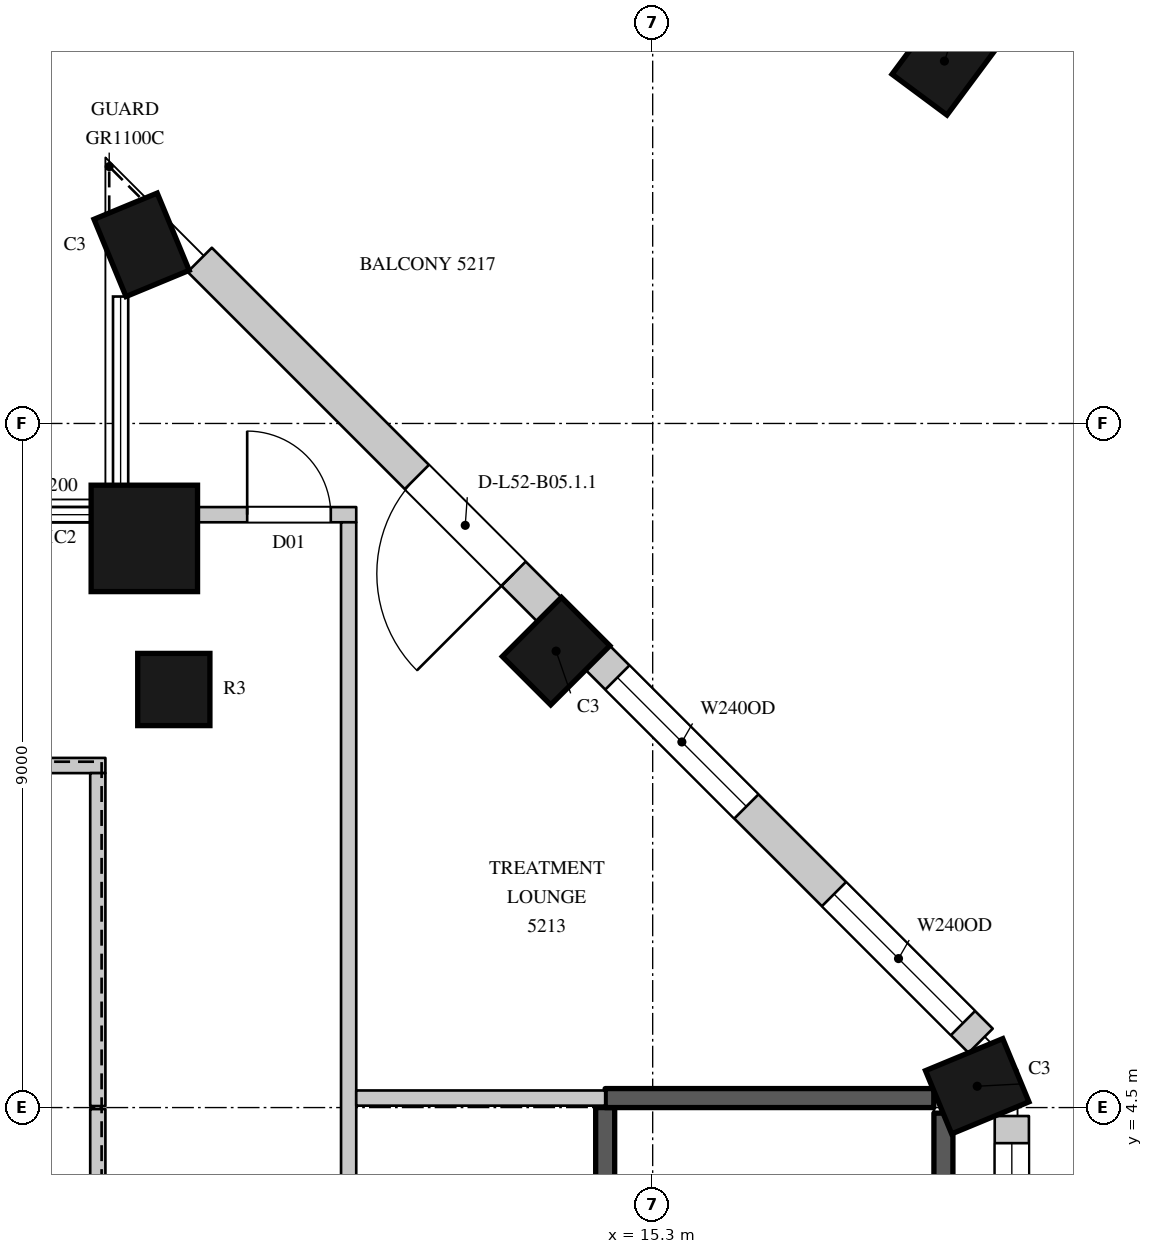
"""IFC4 building model, lengths in metres.
Left out: names, types, materials, properties, quantities, classifications, styles, units other than length and angle.
Written with IfcOpenShell. Run it as: python <this file> out.ifc"""

import sys

from ifc_helpers import new_model, si_unit, direction, frame, frame_2d, origin, origin_2d, place, context, subcontext, project, spatial, rectangle, circle, extrude, element, fill, save


model = new_model("IFC4")
c1 = context("Model", 3, precision=1e-05, world=origin(), true_north=direction((0.0, 1.0)))
c2 = subcontext(c1, "Body", "Model", "MODEL_VIEW")
j1 = project(units=[si_unit("LENGTHUNIT", "METRE"), si_unit("PLANEANGLEUNIT", "RADIAN")], contexts=[c1])
p1 = place(None, origin())
s1 = spatial("IfcSite", under=j1, at=p1, CompositionType="ELEMENT")
p2 = place(p1, origin())
s2 = spatial("IfcBuilding", under=s1, at=p2, CompositionType="ELEMENT")
p3 = place(p2, frame((0.0, 0.0, 234.3)))
s3 = spatial("IfcBuildingStorey", under=s2, at=p3, CompositionType="ELEMENT", Elevation=234.3)
for number, where, z_axis, x_axis in (
    (1, (19.57, 4.78, 0.0), (0.0, 0.0, 1.0), (-0.383, 0.924, 0.0)),
    (2, (14.029, 10.505, 0.0), (0.0, 0.0, 1.0), (-0.707, 0.707, 0.0)),
    (3, (8.576, 15.85, 0.0), (0.0, 0.0, 1.0), (-0.924, -0.383, 0.0)),
):
    element("IfcColumn", number, at=place(p3, frame(where, z_axis=z_axis, x_axis=x_axis)), inside=s3, PredefinedType="COLUMN", context=c2, shape_type="SweptSolid", body=[
        extrude(rectangle(XDim=0.9, YDim=1.1, at=origin_2d()), origin(), (0.0, 0.0, 1.0), 4.1),
    ])
p4 = place(p3, frame((8.612, 11.988, 0.0), z_axis=(0.0, 0.0, 1.0), x_axis=(1.0, 0.0, 0.0)))
e4 = element("IfcColumn", 4, at=p4, inside=s3, PredefinedType="COLUMN", context=c2, shape_type="SweptSolid", body=[
    extrude(circle(Radius=0.7, at=origin_2d()), origin(), (0.0, 0.0, 1.0), 4.1),
])
p5 = place(p3, frame((19.138, 18.268, 0.0), z_axis=(0.0, 0.0, 1.0), x_axis=(-0.802798546114, 0.596250362144, 0.0)))
e5 = element("IfcColumn", 5, at=p5, inside=s3, PredefinedType="COLUMN", context=c2, shape_type="SweptSolid", body=[
    extrude(rectangle(XDim=0.9, YDim=1.1, at=origin_2d()), origin(), (0.0, 0.0, 1.0), 4.1),
])
p6 = place(p3, frame((9.0, 10.0, 0.0), z_axis=(0.0, 0.0, 1.0), x_axis=(1.0, 0.0, 0.0)))
e6 = element("IfcColumn", 6, at=p6, inside=s3, PredefinedType="COLUMN", context=c2, shape_type="SweptSolid", body=[
    extrude(circle(Radius=0.475, at=origin_2d()), origin(), (0.0, 0.0, 1.0), 4.1),
])
p7 = place(p3, frame((20.025, -4.05, 0.0), z_axis=(0.0, 0.0, 1.0), x_axis=(0.0, 1.0, 0.0)))
e7 = element("IfcWall", 7, at=p7, inside=s3, PredefinedType="SOLIDWALL", context=c2, shape_type="SweptSolid", body=[
    extrude(rectangle(XDim=8.439, YDim=0.45, at=frame_2d((4.219, 0.0))), origin(), (0.0, 0.0, 1.0), 3.8),
])
p8 = place(p7, frame((0.394, 0.0, 1.05)))
e8 = element("IfcOpeningElement", 8, at=p8, cuts=e7, PredefinedType="OPENING", context=c2, shape_type="SweptSolid", body=[
    extrude(rectangle(XDim=3.0, YDim=2.4, at=frame_2d((1.5, 1.2))), frame((0.0, 0.235, 0.0), z_axis=(0.0, -1.0, 0.0), x_axis=(1.0, 0.0, 0.0)), (0.0, 0.0, 1.0), 0.47),
])
p9 = place(p7, frame((5.082, 0.0, 1.05)))
e9 = element("IfcOpeningElement", 9, at=p9, cuts=e7, PredefinedType="OPENING", context=c2, shape_type="SweptSolid", body=[
    extrude(rectangle(XDim=3.0, YDim=2.4, at=frame_2d((1.5, 1.2))), frame((0.0, 0.235, 0.0), z_axis=(0.0, -1.0, 0.0), x_axis=(1.0, 0.0, 0.0)), (0.0, 0.0, 1.0), 0.47),
])
p10 = place(p3, frame((19.615, 5.379, 0.0), z_axis=(0.0, 0.0, 1.0), x_axis=(-0.707089646058, 0.7071239159, 0.0)))
e10 = element("IfcWall", 10, at=p10, inside=s3, PredefinedType="SOLIDWALL", context=c2, shape_type="SweptSolid", body=[
    extrude(rectangle(XDim=7.124, YDim=0.45, at=frame_2d((3.562, 0.0))), origin(), (0.0, 0.0, 1.0), 3.8),
])
p11 = place(p10, frame((0.328, 0.0, 1.05)))
e11 = element("IfcOpeningElement", 11, at=p11, cuts=e10, PredefinedType="OPENING", context=c2, shape_type="SweptSolid", body=[
    extrude(rectangle(XDim=2.4, YDim=2.4, at=frame_2d((1.2, 1.2))), frame((0.0, 0.235, 0.0), z_axis=(0.0, -1.0, 0.0), x_axis=(1.0, 0.0, 0.0)), (0.0, 0.0, 1.0), 0.47),
])
p12 = place(p10, frame((4.359, 0.0, 1.05)))
e12 = element("IfcOpeningElement", 12, at=p12, cuts=e10, PredefinedType="OPENING", context=c2, shape_type="SweptSolid", body=[
    extrude(rectangle(XDim=2.4, YDim=2.4, at=frame_2d((1.2, 1.2))), frame((0.0, 0.235, 0.0), z_axis=(0.0, -1.0, 0.0), x_axis=(1.0, 0.0, 0.0)), (0.0, 0.0, 1.0), 0.47),
])
p13 = place(p3, frame((13.941, 11.053, 0.0), z_axis=(0.0, 0.0, 1.0), x_axis=(-0.707106781187, 0.707106781187, 0.0)))
e13 = element("IfcWall", 13, at=p13, inside=s3, PredefinedType="SOLIDWALL", context=c2, shape_type="SweptSolid", body=[
    extrude(rectangle(XDim=6.505, YDim=0.45, at=frame_2d((3.252, 0.0))), origin(), (0.0, 0.0, 1.0), 3.8),
])
p14 = place(p13, frame((0.665, 0.0, 0.0)))
e14 = element("IfcOpeningElement", 14, at=p14, cuts=e13, PredefinedType="OPENING", context=c2, shape_type="SweptSolid", body=[
    extrude(rectangle(XDim=1.8, YDim=2.4, at=frame_2d((0.9, 1.2))), frame((0.0, 0.235, 0.0), z_axis=(0.0, -1.0, 0.0), x_axis=(1.0, 0.0, 0.0)), (0.0, 0.0, 1.0), 0.47),
])
p15 = place(p3, frame((18.65, 7.864, 0.0), z_axis=(0.0, 0.0, 1.0), x_axis=(-0.707059037574, 0.707154521576, 0.0)))
e15 = element("IfcWall", 15, at=p15, inside=s3, PredefinedType="SOLIDWALL", context=c2, shape_type="SweptSolid", body=[
    extrude(rectangle(XDim=2.557, YDim=0.45, at=frame_2d((1.278, 0.0))), origin(), (0.0, 0.0, 1.0), 0.6),
])
p16 = place(p3, frame((16.206, 10.308, 0.0), z_axis=(0.0, 0.0, 1.0), x_axis=(-0.707057827829, 0.707155731156, 0.0)))
e16 = element("IfcWall", 16, at=p16, inside=s3, PredefinedType="SOLIDWALL", context=c2, shape_type="SweptSolid", body=[
    extrude(rectangle(XDim=2.494, YDim=0.45, at=frame_2d((1.247, 0.0))), origin(), (0.0, 0.0, 1.0), 0.6),
])
p17 = place(p3, frame((12.251, 14.263, 0.0), z_axis=(0.0, 0.0, 1.0), x_axis=(-0.707039709166, 0.707173846846, 0.0)))
e17 = element("IfcWall", 17, at=p17, inside=s3, PredefinedType="SOLIDWALL", context=c2, shape_type="SweptSolid", body=[
    extrude(rectangle(XDim=1.82, YDim=0.45, at=frame_2d((0.91, 0.0))), origin(), (0.0, 0.0, 1.0), 0.6),
])
p18 = place(p3, frame((6.75, 12.3, 0.0), z_axis=(0.0, 0.0, 1.0), x_axis=(1.0, 0.0, 0.0)))
e18 = element("IfcWall", 18, at=p18, inside=s3, PredefinedType="PARTITIONING", context=c2, shape_type="SweptSolid", body=[
    extrude(rectangle(XDim=1.209, YDim=0.2, at=frame_2d((0.604, 0.0))), origin(), (0.0, 0.0, 1.0), 3.8),
])
p19 = place(p3, frame((-6.1, 9.0, 0.0), z_axis=(0.0, 0.0, 1.0), x_axis=(1.0, 0.0, 0.0)))
e19 = element("IfcWall", 19, at=p19, inside=s3, PredefinedType="PARTITIONING", context=c2, shape_type="SweptSolid", body=[
    extrude(rectangle(XDim=14.2, YDim=0.2, at=frame_2d((7.1, 0.0))), origin(), (0.0, 0.0, 1.0), 3.8),
])
p20 = place(p3, frame((8.0, -8.9, 0.0), z_axis=(0.0, 0.0, 1.0), x_axis=(0.0, 1.0, 0.0)))
e20 = element("IfcWall", 20, at=p20, inside=s3, PredefinedType="PARTITIONING", context=c2, shape_type="SweptSolid", body=[
    extrude(rectangle(XDim=13.38, YDim=0.2, at=frame_2d((6.69, 0.0))), origin(), (0.0, 0.0, 1.0), 3.8),
])
p21 = place(p3, frame((8.0, 4.52, 0.0), z_axis=(0.0, 0.0, 1.0), x_axis=(0.0, 1.0, 0.0)))
e21 = element("IfcWall", 21, at=p21, inside=s3, PredefinedType="PARTITIONING", context=c2, shape_type="SweptSolid", body=[
    extrude(rectangle(XDim=4.38, YDim=0.2, at=frame_2d((2.19, 0.0))), origin(), (0.0, 0.0, 1.0), 3.8),
])
p22 = place(p3, frame((9.265, 12.3, 0.0), z_axis=(0.0, 0.0, 1.0), x_axis=(1.0, 0.0, 0.0)))
e22 = element("IfcWall", 22, at=p22, inside=s3, PredefinedType="PARTITIONING", context=c2, shape_type="SweptSolid", body=[
    extrude(rectangle(XDim=2.135, YDim=0.2, at=frame_2d((1.067, 0.0))), origin(), (0.0, 0.0, 1.0), 3.8),
])
p23 = place(p22, frame((0.7, 0.0, 0.0)))
e23 = element("IfcOpeningElement", 23, at=p23, cuts=e22, PredefinedType="OPENING", context=c2, shape_type="SweptSolid", body=[
    extrude(rectangle(XDim=1.1, YDim=2.4, at=frame_2d((0.55, 1.2))), frame((0.0, 0.11, 0.0), z_axis=(0.0, -1.0, 0.0), x_axis=(1.0, 0.0, 0.0)), (0.0, 0.0, 1.0), 0.22),
])
p24 = place(p3, frame((11.3, -12.3, 0.0), z_axis=(0.0, 0.0, 1.0), x_axis=(0.0, 1.0, 0.0)))
e24 = element("IfcWall", 24, at=p24, inside=s3, PredefinedType="PARTITIONING", context=c2, shape_type="SweptSolid", body=[
    extrude(rectangle(XDim=24.5, YDim=0.2, at=frame_2d((12.25, 0.0))), origin(), (0.0, 0.0, 1.0), 3.8),
])
p25 = place(p24, frame((10.15, 0.0, 0.0)))
e25 = element("IfcOpeningElement", 25, at=p25, cuts=e24, PredefinedType="OPENING", context=c2, shape_type="SweptSolid", body=[
    extrude(rectangle(XDim=1.5, YDim=2.4, at=frame_2d((0.75, 1.2))), frame((0.0, 0.11, 0.0), z_axis=(0.0, -1.0, 0.0), x_axis=(1.0, 0.0, 0.0)), (0.0, 0.0, 1.0), 0.22),
])
p26 = place(p24, frame((3.3, 0.0, 0.0)))
e26 = element("IfcOpeningElement", 26, at=p26, cuts=e24, PredefinedType="OPENING", context=c2, shape_type="SweptSolid", body=[
    extrude(rectangle(XDim=1.1, YDim=2.4, at=frame_2d((0.55, 1.2))), frame((0.0, 0.11, 0.0), z_axis=(0.0, -1.0, 0.0), x_axis=(1.0, 0.0, 0.0)), (0.0, 0.0, 1.0), 0.22),
])
p27 = place(p3, frame((11.4, 4.625, 0.0), z_axis=(0.0, 0.0, 1.0), x_axis=(1.0, 0.0, 0.0)))
e27 = element("IfcWall", 27, at=p27, inside=s3, PredefinedType="PARTITIONING", context=c2, shape_type="SweptSolid", body=[
    extrude(rectangle(XDim=3.275, YDim=0.2, at=frame_2d((1.638, 0.0))), origin(), (0.0, 0.0, 1.0), 3.8),
])
p28 = place(p3, frame((14.675, -4.5, 0.0), z_axis=(0.0, 0.0, 1.0), x_axis=(0.0, 1.0, 0.0)))
e28 = element("IfcWall", 28, at=p28, inside=s3, PredefinedType="SHEAR", context=c2, shape_type="SweptSolid", body=[
    extrude(rectangle(XDim=9.0, YDim=0.25, at=frame_2d((4.5, 0.0))), origin(), (0.0, 0.0, 1.0), 3.8),
])
p29 = place(p28, frame((0.45, 0.0, 0.0)))
e29 = element("IfcOpeningElement", 29, at=p29, cuts=e28, PredefinedType="OPENING", context=c2, shape_type="SweptSolid", body=[
    extrude(rectangle(XDim=1.1, YDim=2.2, at=frame_2d((0.55, 1.1))), frame((0.0, 0.135, 0.0), z_axis=(0.0, -1.0, 0.0), x_axis=(1.0, 0.0, 0.0)), (0.0, 0.0, 1.0), 0.27),
])
p30 = place(p3, frame((14.675, 4.625, 0.0), z_axis=(0.0, 0.0, 1.0), x_axis=(1.0, 0.0, 0.0)))
e30 = element("IfcWall", 30, at=p30, inside=s3, PredefinedType="SHEAR", context=c2, shape_type="SweptSolid", body=[
    extrude(rectangle(XDim=4.324, YDim=0.25, at=frame_2d((2.162, 0.0))), origin(), (0.0, 0.0, 1.0), 3.8),
])
p31 = place(p3, frame((19.125, -4.05, 0.0), z_axis=(0.0, 0.0, 1.0), x_axis=(0.0, 1.0, 0.0)))
e31 = element("IfcWall", 31, at=p31, inside=s3, PredefinedType="SHEAR", context=c2, shape_type="SweptSolid", body=[
    extrude(rectangle(XDim=8.477, YDim=0.25, at=frame_2d((4.238, 0.0))), origin(), (0.0, 0.0, 1.0), 3.8),
])
p32 = place(p9, origin())
e32 = element("IfcWindow", 32, at=p32, inside=s3, PartitioningType="SINGLE_PANEL", PredefinedType="WINDOW", context=c2, shape_type="SweptSolid", body=[
    extrude(rectangle(XDim=3.0, YDim=2.4, at=frame_2d((1.5, 1.2))), frame((0.0, 0.135, 0.0), z_axis=(0.0, -1.0, 0.0), x_axis=(1.0, 0.0, 0.0)), (0.0, 0.0, 1.0), 0.06),
])
fill(e9, e32)
p33 = place(p11, origin())
e33 = element("IfcWindow", 33, at=p33, inside=s3, PartitioningType="SINGLE_PANEL", PredefinedType="WINDOW", context=c2, shape_type="SweptSolid", body=[
    extrude(rectangle(XDim=2.4, YDim=2.4, at=frame_2d((1.2, 1.2))), frame((0.0, 0.135, 0.0), z_axis=(0.0, -1.0, 0.0), x_axis=(1.0, 0.0, 0.0)), (0.0, 0.0, 1.0), 0.06),
])
fill(e11, e33)
p34 = place(p12, origin())
e34 = element("IfcWindow", 34, at=p34, inside=s3, PartitioningType="SINGLE_PANEL", PredefinedType="WINDOW", context=c2, shape_type="SweptSolid", body=[
    extrude(rectangle(XDim=2.4, YDim=2.4, at=frame_2d((1.2, 1.2))), frame((0.0, 0.135, 0.0), z_axis=(0.0, -1.0, 0.0), x_axis=(1.0, 0.0, 0.0)), (0.0, 0.0, 1.0), 0.06),
])
fill(e12, e34)
p35 = place(p14, origin())
e35 = element("IfcDoor", 35, at=p35, inside=s3, OperationType="SLIDING_TO_LEFT", PredefinedType="DOOR", context=c2, shape_type="SweptSolid", body=[
    extrude(rectangle(XDim=1.8, YDim=2.4, at=frame_2d((0.9, 1.2))), frame((0.0, 0.13, 0.0), z_axis=(0.0, -1.0, 0.0), x_axis=(1.0, 0.0, 0.0)), (0.0, 0.0, 1.0), 0.05),
])
fill(e14, e35)
p36 = place(p23, origin())
e36 = element("IfcDoor", 36, at=p36, inside=s3, OperationType="SINGLE_SWING_LEFT", PredefinedType="DOOR", context=c2, shape_type="SweptSolid", body=[
    extrude(rectangle(XDim=1.1, YDim=2.4, at=frame_2d((0.55, 1.2))), frame((0.0, 0.025, 0.0), z_axis=(0.0, -1.0, 0.0), x_axis=(1.0, 0.0, 0.0)), (0.0, 0.0, 1.0), 0.05),
])
fill(e23, e36)
save(model, sys.argv[1])
